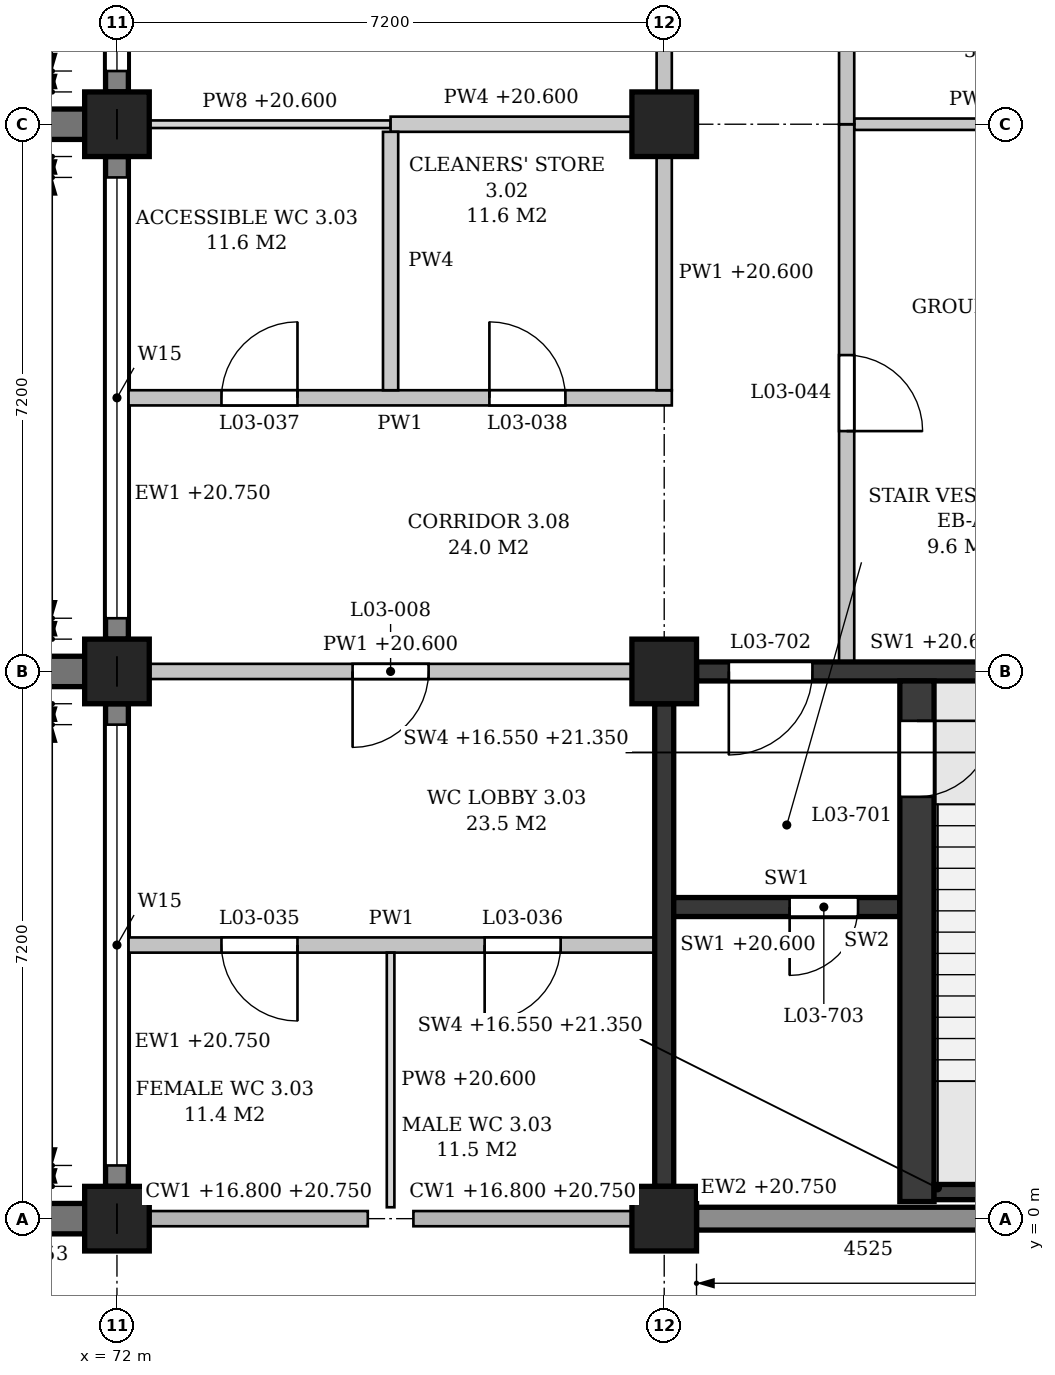
"""IFC4 building model, lengths in metres.
Left out: names, types, materials, properties, quantities, classifications, styles, units other than length and angle.
Written with IfcOpenShell. Run it as: python <this file> out.ifc"""

import sys

from ifc_helpers import new_model, si_unit, direction, frame, frame_2d, origin, origin_2d, place, context, subcontext, project, spatial, polyline, rectangle, outline, extrude, element, fill, save


model = new_model("IFC4")
c1 = context("Model", 3, precision=1e-05, world=origin(), true_north=direction((0.0, 1.0)))
c2 = subcontext(c1, "Body", "Model", "MODEL_VIEW")
j1 = project(units=[si_unit("LENGTHUNIT", "METRE"), si_unit("PLANEANGLEUNIT", "RADIAN")], contexts=[c1])
p1 = place(None, origin())
s1 = spatial("IfcSite", under=j1, at=p1, CompositionType="ELEMENT")
p2 = place(p1, origin())
s2 = spatial("IfcBuilding", under=s1, at=p2, CompositionType="ELEMENT")
p3 = place(p2, frame((0.0, 0.0, 16.8)))
s3 = spatial("IfcBuildingStorey", under=s2, at=p3, CompositionType="ELEMENT", Elevation=16.8)
for number, where, z_axis, x_axis in (
    (1, (72.0, 0.0, 0.0), (0.0, 0.0, 1.0), (1.0, 0.0, 0.0)),
    (2, (72.0, 7.2, 0.0), (0.0, 0.0, 1.0), (1.0, 0.0, 0.0)),
    (3, (72.0, 14.4, 0.0), (0.0, 0.0, 1.0), (1.0, 0.0, 0.0)),
    (4, (79.2, 0.0, 0.0), (0.0, 0.0, 1.0), (1.0, 0.0, 0.0)),
    (5, (79.2, 7.2, 0.0), (0.0, 0.0, 1.0), (1.0, 0.0, 0.0)),
    (6, (79.2, 14.4, 0.0), (0.0, 0.0, 1.0), (1.0, 0.0, 0.0)),
):
    element("IfcColumn", number, at=place(p3, frame(where, z_axis=z_axis, x_axis=x_axis)), inside=s3, PredefinedType="COLUMN", context=c2, shape_type="SweptSolid", body=[
        extrude(rectangle(XDim=0.85, YDim=0.85, at=origin_2d()), origin(), (0.0, 0.0, 1.0), 4.8),
    ])
p4 = place(p3, frame((79.625, 0.0, 0.0), z_axis=(0.0, 0.0, 1.0), x_axis=(1.0, 0.0, 0.0)))
e7 = element("IfcWall", 7, at=p4, inside=s3, PredefinedType="STANDARD", context=c2, shape_type="SweptSolid", body=[
    extrude(rectangle(XDim=6.35, YDim=0.3, at=frame_2d((3.175, 0.0))), origin(), (0.0, 0.0, 1.0), 3.95),
])
p5 = place(p4, frame((4.525, 0.0, 0.9)))
e8 = element("IfcOpeningElement", 8, at=p5, cuts=e7, PredefinedType="OPENING", context=c2, shape_type="SweptSolid", body=[
    extrude(outline(polyline([(0.0, 0.0), (0.9, 0.0), (0.9, 2.05), (0.45, 2.5), (0.0, 2.05), (0.0, 0.0)])), frame((0.0, 0.16, 0.0), z_axis=(0.0, -1.0, 0.0), x_axis=(1.0, 0.0, 0.0)), (0.0, 0.0, 1.0), 0.32),
])
p6 = place(p3, frame((72.0, 0.425, 0.0), z_axis=(0.0, 0.0, 1.0), x_axis=(0.0, 1.0, 0.0)))
e9 = element("IfcWall", 9, at=p6, inside=s3, PredefinedType="STANDARD", context=c2, shape_type="SweptSolid", body=[
    extrude(rectangle(XDim=6.35, YDim=0.3, at=frame_2d((3.175, 0.0))), origin(), (0.0, 0.0, 1.0), 3.95),
])
p7 = place(p6, frame((0.275, 0.0, 0.9)))
e10 = element("IfcOpeningElement", 10, at=p7, cuts=e9, PredefinedType="OPENING", context=c2, shape_type="SweptSolid", body=[
    extrude(outline(polyline([(0.0, 0.0), (5.8, 0.0), (5.8, 1.0), (2.9, 2.5), (0.0, 1.0), (0.0, 0.0)])), frame((0.0, 0.16, 0.0), z_axis=(0.0, -1.0, 0.0), x_axis=(1.0, 0.0, 0.0)), (0.0, 0.0, 1.0), 0.32),
])
p8 = place(p3, frame((72.0, 7.625, 0.0), z_axis=(0.0, 0.0, 1.0), x_axis=(0.0, 1.0, 0.0)))
e11 = element("IfcWall", 11, at=p8, inside=s3, PredefinedType="STANDARD", context=c2, shape_type="SweptSolid", body=[
    extrude(rectangle(XDim=6.35, YDim=0.3, at=frame_2d((3.175, 0.0))), origin(), (0.0, 0.0, 1.0), 3.95),
])
p9 = place(p8, frame((0.275, 0.0, 0.9)))
e12 = element("IfcOpeningElement", 12, at=p9, cuts=e11, PredefinedType="OPENING", context=c2, shape_type="SweptSolid", body=[
    extrude(outline(polyline([(0.0, 0.0), (5.8, 0.0), (5.8, 1.0), (2.9, 2.5), (0.0, 1.0), (0.0, 0.0)])), frame((0.0, 0.16, 0.0), z_axis=(0.0, -1.0, 0.0), x_axis=(1.0, 0.0, 0.0)), (0.0, 0.0, 1.0), 0.32),
])
p10 = place(p3, frame((72.0, 14.825, 0.0), z_axis=(0.0, 0.0, 1.0), x_axis=(0.0, 1.0, 0.0)))
e13 = element("IfcWall", 13, at=p10, inside=s3, PredefinedType="STANDARD", context=c2, shape_type="SweptSolid", body=[
    extrude(rectangle(XDim=6.35, YDim=0.3, at=frame_2d((3.175, 0.0))), origin(), (0.0, 0.0, 1.0), 3.95),
])
p11 = place(p10, frame((0.275, 0.0, 0.9)))
e14 = element("IfcOpeningElement", 14, at=p11, cuts=e13, PredefinedType="OPENING", context=c2, shape_type="SweptSolid", body=[
    extrude(outline(polyline([(0.0, 0.0), (5.8, 0.0), (5.8, 1.0), (2.9, 2.5), (0.0, 1.0), (0.0, 0.0)])), frame((0.0, 0.16, 0.0), z_axis=(0.0, -1.0, 0.0), x_axis=(1.0, 0.0, 0.0)), (0.0, 0.0, 1.0), 0.32),
])
for number, where, z_axis, x_axis in (
    (15, (71.575, 0.0, 0.0), (0.0, 0.0, 1.0), (-1.0, 0.0, 0.0)),
    (16, (71.575, 7.2, 0.0), (0.0, 0.0, 1.0), (-1.0, 0.0, 0.0)),
    (17, (71.575, 14.4, 0.0), (0.0, 0.0, 1.0), (-1.0, 0.0, 0.0)),
):
    element("IfcWall", number, at=place(p3, frame(where, z_axis=z_axis, x_axis=x_axis)), inside=s3, PredefinedType="POLYGONAL", context=c2, shape_type="SweptSolid", body=[
        extrude(outline(polyline([(0.6, 0.0), (0.6, 4.55), (0.0, 4.55), (0.0, 0.0), (0.6, 0.0)])), frame((0.0, 0.2, 0.0), z_axis=(0.0, -1.0, 0.0), x_axis=(1.0, 0.0, 0.0)), (0.0, 0.0, 1.0), 0.4),
    ])
p12 = place(p3, frame((79.625, 7.2, 0.0), z_axis=(0.0, 0.0, 1.0), x_axis=(1.0, 0.0, 0.0)))
e18 = element("IfcWall", 18, at=p12, inside=s3, PredefinedType="SHEAR", context=c2, shape_type="SweptSolid", body=[
    extrude(rectangle(XDim=6.35, YDim=0.25, at=frame_2d((3.175, 0.0))), origin(), (0.0, 0.0, 1.0), 3.8),
])
p13 = place(p12, frame((0.425, 0.0, 0.0)))
e19 = element("IfcOpeningElement", 19, at=p13, cuts=e18, PredefinedType="OPENING", context=c2, shape_type="SweptSolid", body=[
    extrude(rectangle(XDim=1.1, YDim=2.1, at=frame_2d((0.55, 1.05))), frame((0.0, 0.135, 0.0), z_axis=(0.0, -1.0, 0.0), x_axis=(1.0, 0.0, 0.0)), (0.0, 0.0, 1.0), 0.27),
])
p14 = place(p3, frame((79.2, 0.425, 0.0), z_axis=(0.0, 0.0, 1.0), x_axis=(0.0, 1.0, 0.0)))
e20 = element("IfcWall", 20, at=p14, inside=s3, PredefinedType="SHEAR", context=c2, shape_type="SweptSolid", body=[
    extrude(rectangle(XDim=6.35, YDim=0.25, at=frame_2d((3.175, 0.0))), origin(), (0.0, 0.0, 1.0), 3.8),
])
p15 = place(p3, frame((82.75, 0.35, -0.25), z_axis=(0.0, 0.0, 1.0), x_axis=(1.0, 0.0, 0.0)))
e21 = element("IfcWall", 21, at=p15, inside=s3, PredefinedType="SHEAR", context=c2, shape_type="SweptSolid", body=[
    extrude(rectangle(XDim=1.4, YDim=0.2, at=frame_2d((0.7, 0.0))), origin(), (0.0, 0.0, 1.0), 4.8),
])
p16 = place(p3, frame((82.525, 0.225, 0.0), z_axis=(0.0, 0.0, 1.0), x_axis=(0.0, 1.0, 0.0)))
e22 = element("IfcWall", 22, at=p16, inside=s3, PredefinedType="SHEAR", context=c2, shape_type="SweptSolid", body=[
    extrude(rectangle(XDim=6.85, YDim=0.45, at=frame_2d((3.425, 0.0))), origin(), (0.0, 0.0, 1.0), 4.55),
])
p17 = place(p16, frame((5.325, 0.0, 0.0)))
e23 = element("IfcOpeningElement", 23, at=p17, cuts=e22, PredefinedType="OPENING", context=c2, shape_type="SweptSolid", body=[
    extrude(rectangle(XDim=1.0, YDim=2.1, at=frame_2d((0.5, 1.05))), frame((0.0, 0.235, 0.0), z_axis=(0.0, -1.0, 0.0), x_axis=(1.0, 0.0, 0.0)), (0.0, 0.0, 1.0), 0.47),
])
p18 = place(p3, frame((79.325, 4.1, 0.0), z_axis=(0.0, 0.0, 1.0), x_axis=(1.0, 0.0, 0.0)))
e24 = element("IfcWall", 24, at=p18, inside=s3, PredefinedType="SHEAR", context=c2, shape_type="SweptSolid", body=[
    extrude(rectangle(XDim=2.975, YDim=0.25, at=frame_2d((1.488, 0.0))), origin(), (0.0, 0.0, 1.0), 4.55),
])
p19 = place(p18, frame((1.525, 0.0, 0.0)))
e25 = element("IfcOpeningElement", 25, at=p19, cuts=e24, PredefinedType="OPENING", context=c2, shape_type="SweptSolid", body=[
    extrude(rectangle(XDim=0.9, YDim=2.1, at=frame_2d((0.45, 1.05))), frame((0.0, 0.135, 0.0), z_axis=(0.0, -1.0, 0.0), x_axis=(1.0, 0.0, 0.0)), (0.0, 0.0, 1.0), 0.27),
])
p20 = place(p3, frame((72.15, 3.6, 0.0), z_axis=(0.0, 0.0, 1.0), x_axis=(1.0, 0.0, 0.0)))
e26 = element("IfcWall", 26, at=p20, inside=s3, PredefinedType="PARTITIONING", context=c2, shape_type="SweptSolid", body=[
    extrude(outline(polyline([(0.0, 0.0), (6.925, 0.0), (6.925, 3.8), (6.8, 3.8), (6.8, 4.55), (0.1, 4.55), (0.1, 3.95), (0.0, 3.95), (0.0, 0.0)])), frame((0.0, 0.1, 0.0), z_axis=(0.0, -1.0, 0.0), x_axis=(1.0, 0.0, 0.0)), (0.0, 0.0, 1.0), 0.2),
])
p21 = place(p20, frame((1.225, 0.0, 0.0)))
e27 = element("IfcOpeningElement", 27, at=p21, cuts=e26, PredefinedType="OPENING", context=c2, shape_type="SweptSolid", body=[
    extrude(rectangle(XDim=1.0, YDim=2.1, at=frame_2d((0.5, 1.05))), frame((0.0, 0.11, 0.0), z_axis=(0.0, -1.0, 0.0), x_axis=(1.0, 0.0, 0.0)), (0.0, 0.0, 1.0), 0.22),
])
p22 = place(p20, frame((4.688, 0.0, 0.0)))
e28 = element("IfcOpeningElement", 28, at=p22, cuts=e26, PredefinedType="OPENING", context=c2, shape_type="SweptSolid", body=[
    extrude(rectangle(XDim=1.0, YDim=2.1, at=frame_2d((0.5, 1.05))), frame((0.0, 0.11, 0.0), z_axis=(0.0, -1.0, 0.0), x_axis=(1.0, 0.0, 0.0)), (0.0, 0.0, 1.0), 0.22),
])
p23 = place(p3, frame((72.425, 7.2, 0.0), z_axis=(0.0, 0.0, 1.0), x_axis=(1.0, 0.0, 0.0)))
e29 = element("IfcWall", 29, at=p23, inside=s3, PredefinedType="PARTITIONING", context=c2, shape_type="SweptSolid", body=[
    extrude(rectangle(XDim=6.35, YDim=0.2, at=frame_2d((3.175, 0.0))), origin(), (0.0, 0.0, 1.0), 3.8),
])
p24 = place(p23, frame((2.675, 0.0, 0.0)))
e30 = element("IfcOpeningElement", 30, at=p24, cuts=e29, PredefinedType="OPENING", context=c2, shape_type="SweptSolid", body=[
    extrude(rectangle(XDim=1.0, YDim=2.1, at=frame_2d((0.5, 1.05))), frame((0.0, 0.11, 0.0), z_axis=(0.0, -1.0, 0.0), x_axis=(1.0, 0.0, 0.0)), (0.0, 0.0, 1.0), 0.22),
])
p25 = place(p3, frame((72.15, 10.8, 0.0), z_axis=(0.0, 0.0, 1.0), x_axis=(1.0, 0.0, 0.0)))
e31 = element("IfcWall", 31, at=p25, inside=s3, PredefinedType="PARTITIONING", context=c2, shape_type="SweptSolid", body=[
    extrude(outline(polyline([(0.0, 0.0), (7.15, 0.0), (7.15, 3.8), (6.8, 3.8), (6.8, 4.55), (0.1, 4.55), (0.1, 3.95), (0.0, 3.95), (0.0, 0.0)])), frame((0.0, 0.1, 0.0), z_axis=(0.0, -1.0, 0.0), x_axis=(1.0, 0.0, 0.0)), (0.0, 0.0, 1.0), 0.2),
])
p26 = place(p25, frame((1.225, 0.0, 0.0)))
e32 = element("IfcOpeningElement", 32, at=p26, cuts=e31, PredefinedType="OPENING", context=c2, shape_type="SweptSolid", body=[
    extrude(rectangle(XDim=1.0, YDim=2.1, at=frame_2d((0.5, 1.05))), frame((0.0, 0.11, 0.0), z_axis=(0.0, -1.0, 0.0), x_axis=(1.0, 0.0, 0.0)), (0.0, 0.0, 1.0), 0.22),
])
p27 = place(p25, frame((4.75, 0.0, 0.0)))
e33 = element("IfcOpeningElement", 33, at=p27, cuts=e31, PredefinedType="OPENING", context=c2, shape_type="SweptSolid", body=[
    extrude(rectangle(XDim=1.0, YDim=2.1, at=frame_2d((0.5, 1.05))), frame((0.0, 0.11, 0.0), z_axis=(0.0, -1.0, 0.0), x_axis=(1.0, 0.0, 0.0)), (0.0, 0.0, 1.0), 0.22),
])
p28 = place(p3, frame((72.425, 14.4, 0.0), z_axis=(0.0, 0.0, 1.0), x_axis=(1.0, 0.0, 0.0)))
e34 = element("IfcWall", 34, at=p28, inside=s3, PredefinedType="PARTITIONING", context=c2, shape_type="SweptSolid", body=[
    extrude(rectangle(XDim=3.175, YDim=0.1, at=frame_2d((1.587, 0.0))), origin(), (0.0, 0.0, 1.0), 3.8),
])
p29 = place(p3, frame((75.6, 14.4, 0.0), z_axis=(0.0, 0.0, 1.0), x_axis=(1.0, 0.0, 0.0)))
e35 = element("IfcWall", 35, at=p29, inside=s3, PredefinedType="PARTITIONING", context=c2, shape_type="SweptSolid", body=[
    extrude(rectangle(XDim=3.175, YDim=0.2, at=frame_2d((1.587, 0.0))), origin(), (0.0, 0.0, 1.0), 3.8),
])
p30 = place(p3, frame((81.7, 14.4, 0.0), z_axis=(0.0, 0.0, 1.0), x_axis=(1.0, 0.0, 0.0)))
e36 = element("IfcWall", 36, at=p30, inside=s3, PredefinedType="PARTITIONING", context=c2, shape_type="SweptSolid", body=[
    extrude(rectangle(XDim=4.275, YDim=0.15, at=frame_2d((2.138, 0.0))), origin(), (0.0, 0.0, 1.0), 3.8),
])
p31 = place(p3, frame((75.6, 0.15, 0.0), z_axis=(0.0, 0.0, 1.0), x_axis=(0.0, 1.0, 0.0)))
e37 = element("IfcWall", 37, at=p31, inside=s3, PredefinedType="PARTITIONING", context=c2, shape_type="SweptSolid", body=[
    extrude(rectangle(XDim=3.35, YDim=0.1, at=frame_2d((1.675, 0.0))), origin(), (0.0, 0.0, 1.0), 3.8),
])
p32 = place(p3, frame((75.6, 10.9, 0.0), z_axis=(0.0, 0.0, 1.0), x_axis=(0.0, 1.0, 0.0)))
e38 = element("IfcWall", 38, at=p32, inside=s3, PredefinedType="PARTITIONING", context=c2, shape_type="SweptSolid", body=[
    extrude(outline(polyline([(0.0, 0.0), (3.4, 0.0), (3.4, 3.8), (3.25, 3.8), (3.25, 4.55), (0.0, 4.55), (0.0, 0.0)])), frame((0.0, 0.1, 0.0), z_axis=(0.0, -1.0, 0.0), x_axis=(1.0, 0.0, 0.0)), (0.0, 0.0, 1.0), 0.2),
])
p33 = place(p3, frame((79.2, 10.9, 0.0), z_axis=(0.0, 0.0, 1.0), x_axis=(0.0, 1.0, 0.0)))
e39 = element("IfcWall", 39, at=p33, inside=s3, PredefinedType="PARTITIONING", context=c2, shape_type="SweptSolid", body=[
    extrude(rectangle(XDim=3.075, YDim=0.2, at=frame_2d((1.538, 0.0))), origin(), (0.0, 0.0, 1.0), 3.8),
])
p34 = place(p3, frame((79.2, 14.825, 0.0), z_axis=(0.0, 0.0, 1.0), x_axis=(0.0, 1.0, 0.0)))
e40 = element("IfcWall", 40, at=p34, inside=s3, PredefinedType="PARTITIONING", context=c2, shape_type="SweptSolid", body=[
    extrude(rectangle(XDim=6.35, YDim=0.2, at=frame_2d((3.175, 0.0))), origin(), (0.0, 0.0, 1.0), 3.8),
])
p35 = place(p34, frame((2.175, 0.0, 0.0)))
e41 = element("IfcOpeningElement", 41, at=p35, cuts=e40, PredefinedType="OPENING", context=c2, shape_type="SweptSolid", body=[
    extrude(rectangle(XDim=2.0, YDim=2.1, at=frame_2d((1.0, 1.05))), frame((0.0, 0.11, 0.0), z_axis=(0.0, -1.0, 0.0), x_axis=(1.0, 0.0, 0.0)), (0.0, 0.0, 1.0), 0.22),
])
p36 = place(p3, frame((81.6, 7.325, 0.0), z_axis=(0.0, 0.0, 1.0), x_axis=(0.0, 1.0, 0.0)))
e42 = element("IfcWall", 42, at=p36, inside=s3, PredefinedType="PARTITIONING", context=c2, shape_type="SweptSolid", body=[
    extrude(outline(polyline([(0.0, 0.0), (7.075, 0.0), (7.075, 3.8), (6.825, 3.8), (6.825, 4.55), (0.125, 4.55), (0.125, 3.8), (0.0, 3.8), (0.0, 0.0)])), frame((0.0, 0.1, 0.0), z_axis=(0.0, -1.0, 0.0), x_axis=(1.0, 0.0, 0.0)), (0.0, 0.0, 1.0), 0.2),
])
p37 = place(p36, frame((3.037, 0.0, 0.0)))
e43 = element("IfcOpeningElement", 43, at=p37, cuts=e42, PredefinedType="OPENING", context=c2, shape_type="SweptSolid", body=[
    extrude(rectangle(XDim=1.0, YDim=2.1, at=frame_2d((0.5, 1.05))), frame((0.0, 0.11, 0.0), z_axis=(0.0, -1.0, 0.0), x_axis=(1.0, 0.0, 0.0)), (0.0, 0.0, 1.0), 0.22),
])
p38 = place(p3, frame((81.6, 14.4, 0.0), z_axis=(0.0, 0.0, 1.0), x_axis=(0.0, 1.0, 0.0)))
e44 = element("IfcWall", 44, at=p38, inside=s3, PredefinedType="PARTITIONING", context=c2, shape_type="SweptSolid", body=[
    extrude(outline(polyline([(0.0, 0.0), (7.2, 0.0), (7.2, 3.8), (6.95, 3.8), (6.95, 4.55), (0.25, 4.55), (0.25, 3.8), (0.0, 3.8), (0.0, 0.0)])), frame((0.0, 0.1, 0.0), z_axis=(0.0, -1.0, 0.0), x_axis=(1.0, 0.0, 0.0)), (0.0, 0.0, 1.0), 0.2),
])
p39 = place(p38, frame((2.6, 0.0, 0.0)))
e45 = element("IfcOpeningElement", 45, at=p39, cuts=e44, PredefinedType="OPENING", context=c2, shape_type="SweptSolid", body=[
    extrude(rectangle(XDim=2.0, YDim=2.1, at=frame_2d((1.0, 1.05))), frame((0.0, 0.11, 0.0), z_axis=(0.0, -1.0, 0.0), x_axis=(1.0, 0.0, 0.0)), (0.0, 0.0, 1.0), 0.22),
])
p40 = place(p7, origin())
e46 = element("IfcWindow", 46, at=p40, inside=s3, PartitioningType="TRIPLE_PANEL_VERTICAL", PredefinedType="WINDOW", context=c2, shape_type="SweptSolid", body=[
    extrude(outline(polyline([(0.0, 0.0), (5.8, 0.0), (5.8, 1.0), (2.9, 2.5), (0.0, 1.0), (0.0, 0.0)])), frame((0.0, 0.03, 0.0), z_axis=(0.0, -1.0, 0.0), x_axis=(1.0, 0.0, 0.0)), (0.0, 0.0, 1.0), 0.06),
])
fill(e10, e46)
p41 = place(p9, origin())
e47 = element("IfcWindow", 47, at=p41, inside=s3, PartitioningType="TRIPLE_PANEL_VERTICAL", PredefinedType="WINDOW", context=c2, shape_type="SweptSolid", body=[
    extrude(outline(polyline([(0.0, 0.0), (5.8, 0.0), (5.8, 1.0), (2.9, 2.5), (0.0, 1.0), (0.0, 0.0)])), frame((0.0, 0.03, 0.0), z_axis=(0.0, -1.0, 0.0), x_axis=(1.0, 0.0, 0.0)), (0.0, 0.0, 1.0), 0.06),
])
fill(e12, e47)
p42 = place(p11, origin())
e48 = element("IfcWindow", 48, at=p42, inside=s3, PartitioningType="TRIPLE_PANEL_VERTICAL", PredefinedType="WINDOW", context=c2, shape_type="SweptSolid", body=[
    extrude(outline(polyline([(0.0, 0.0), (5.8, 0.0), (5.8, 1.0), (2.9, 2.5), (0.0, 1.0), (0.0, 0.0)])), frame((0.0, 0.03, 0.0), z_axis=(0.0, -1.0, 0.0), x_axis=(1.0, 0.0, 0.0)), (0.0, 0.0, 1.0), 0.06),
])
fill(e14, e48)
p43 = place(p17, frame((1.0, 0.0, 0.0), z_axis=(0.0, 0.0, 1.0), x_axis=(-1.0, 0.0, 0.0)))
e49 = element("IfcDoor", 49, at=p43, inside=s3, OperationType="SINGLE_SWING_LEFT", PredefinedType="DOOR", context=c2, shape_type="SweptSolid", body=[
    extrude(rectangle(XDim=1.0, YDim=2.1, at=frame_2d((0.5, 1.05))), frame((0.0, 0.025, 0.0), z_axis=(0.0, -1.0, 0.0), x_axis=(1.0, 0.0, 0.0)), (0.0, 0.0, 1.0), 0.05),
])
fill(e23, e49)
p44 = place(p13, frame((1.1, 0.0, 0.0), z_axis=(0.0, 0.0, 1.0), x_axis=(-1.0, 0.0, 0.0)))
e50 = element("IfcDoor", 50, at=p44, inside=s3, OperationType="SINGLE_SWING_RIGHT", PredefinedType="DOOR", context=c2, shape_type="SweptSolid", body=[
    extrude(rectangle(XDim=1.1, YDim=2.1, at=frame_2d((0.55, 1.05))), frame((0.0, 0.025, 0.0), z_axis=(0.0, -1.0, 0.0), x_axis=(1.0, 0.0, 0.0)), (0.0, 0.0, 1.0), 0.05),
])
fill(e19, e50)
p45 = place(p19, frame((0.9, 0.0, 0.0), z_axis=(0.0, 0.0, 1.0), x_axis=(-1.0, 0.0, 0.0)))
e51 = element("IfcDoor", 51, at=p45, inside=s3, OperationType="SINGLE_SWING_RIGHT", PredefinedType="DOOR", context=c2, shape_type="SweptSolid", body=[
    extrude(rectangle(XDim=0.9, YDim=2.1, at=frame_2d((0.45, 1.05))), frame((0.0, 0.025, 0.0), z_axis=(0.0, -1.0, 0.0), x_axis=(1.0, 0.0, 0.0)), (0.0, 0.0, 1.0), 0.05),
])
fill(e25, e51)
p46 = place(p24, frame((1.0, 0.0, 0.0), z_axis=(0.0, 0.0, 1.0), x_axis=(-1.0, 0.0, 0.0)))
e52 = element("IfcDoor", 52, at=p46, inside=s3, OperationType="SINGLE_SWING_RIGHT", PredefinedType="DOOR", context=c2, shape_type="SweptSolid", body=[
    extrude(rectangle(XDim=1.0, YDim=2.1, at=frame_2d((0.5, 1.05))), frame((0.0, 0.025, 0.0), z_axis=(0.0, -1.0, 0.0), x_axis=(1.0, 0.0, 0.0)), (0.0, 0.0, 1.0), 0.05),
])
fill(e30, e52)
p47 = place(p21, frame((1.0, 0.0, 0.0), z_axis=(0.0, 0.0, 1.0), x_axis=(-1.0, 0.0, 0.0)))
e53 = element("IfcDoor", 53, at=p47, inside=s3, OperationType="SINGLE_SWING_LEFT", PredefinedType="DOOR", context=c2, shape_type="SweptSolid", body=[
    extrude(rectangle(XDim=1.0, YDim=2.1, at=frame_2d((0.5, 1.05))), frame((0.0, 0.025, 0.0), z_axis=(0.0, -1.0, 0.0), x_axis=(1.0, 0.0, 0.0)), (0.0, 0.0, 1.0), 0.05),
])
fill(e27, e53)
p48 = place(p22, frame((1.0, 0.0, 0.0), z_axis=(0.0, 0.0, 1.0), x_axis=(-1.0, 0.0, 0.0)))
e54 = element("IfcDoor", 54, at=p48, inside=s3, OperationType="SINGLE_SWING_RIGHT", PredefinedType="DOOR", context=c2, shape_type="SweptSolid", body=[
    extrude(rectangle(XDim=1.0, YDim=2.1, at=frame_2d((0.5, 1.05))), frame((0.0, 0.025, 0.0), z_axis=(0.0, -1.0, 0.0), x_axis=(1.0, 0.0, 0.0)), (0.0, 0.0, 1.0), 0.05),
])
fill(e28, e54)
p49 = place(p26, origin())
e55 = element("IfcDoor", 55, at=p49, inside=s3, OperationType="SINGLE_SWING_RIGHT", PredefinedType="DOOR", context=c2, shape_type="SweptSolid", body=[
    extrude(rectangle(XDim=1.0, YDim=2.1, at=frame_2d((0.5, 1.05))), frame((0.0, 0.025, 0.0), z_axis=(0.0, -1.0, 0.0), x_axis=(1.0, 0.0, 0.0)), (0.0, 0.0, 1.0), 0.05),
])
fill(e32, e55)
p50 = place(p27, origin())
e56 = element("IfcDoor", 56, at=p50, inside=s3, OperationType="SINGLE_SWING_LEFT", PredefinedType="DOOR", context=c2, shape_type="SweptSolid", body=[
    extrude(rectangle(XDim=1.0, YDim=2.1, at=frame_2d((0.5, 1.05))), frame((0.0, 0.025, 0.0), z_axis=(0.0, -1.0, 0.0), x_axis=(1.0, 0.0, 0.0)), (0.0, 0.0, 1.0), 0.05),
])
fill(e33, e56)
p51 = place(p37, frame((1.0, 0.0, 0.0), z_axis=(0.0, 0.0, 1.0), x_axis=(-1.0, 0.0, 0.0)))
e57 = element("IfcDoor", 57, at=p51, inside=s3, OperationType="SINGLE_SWING_RIGHT", PredefinedType="DOOR", context=c2, shape_type="SweptSolid", body=[
    extrude(rectangle(XDim=1.0, YDim=2.1, at=frame_2d((0.5, 1.05))), frame((0.0, 0.025, 0.0), z_axis=(0.0, -1.0, 0.0), x_axis=(1.0, 0.0, 0.0)), (0.0, 0.0, 1.0), 0.05),
])
fill(e43, e57)
save(model, sys.argv[1])
